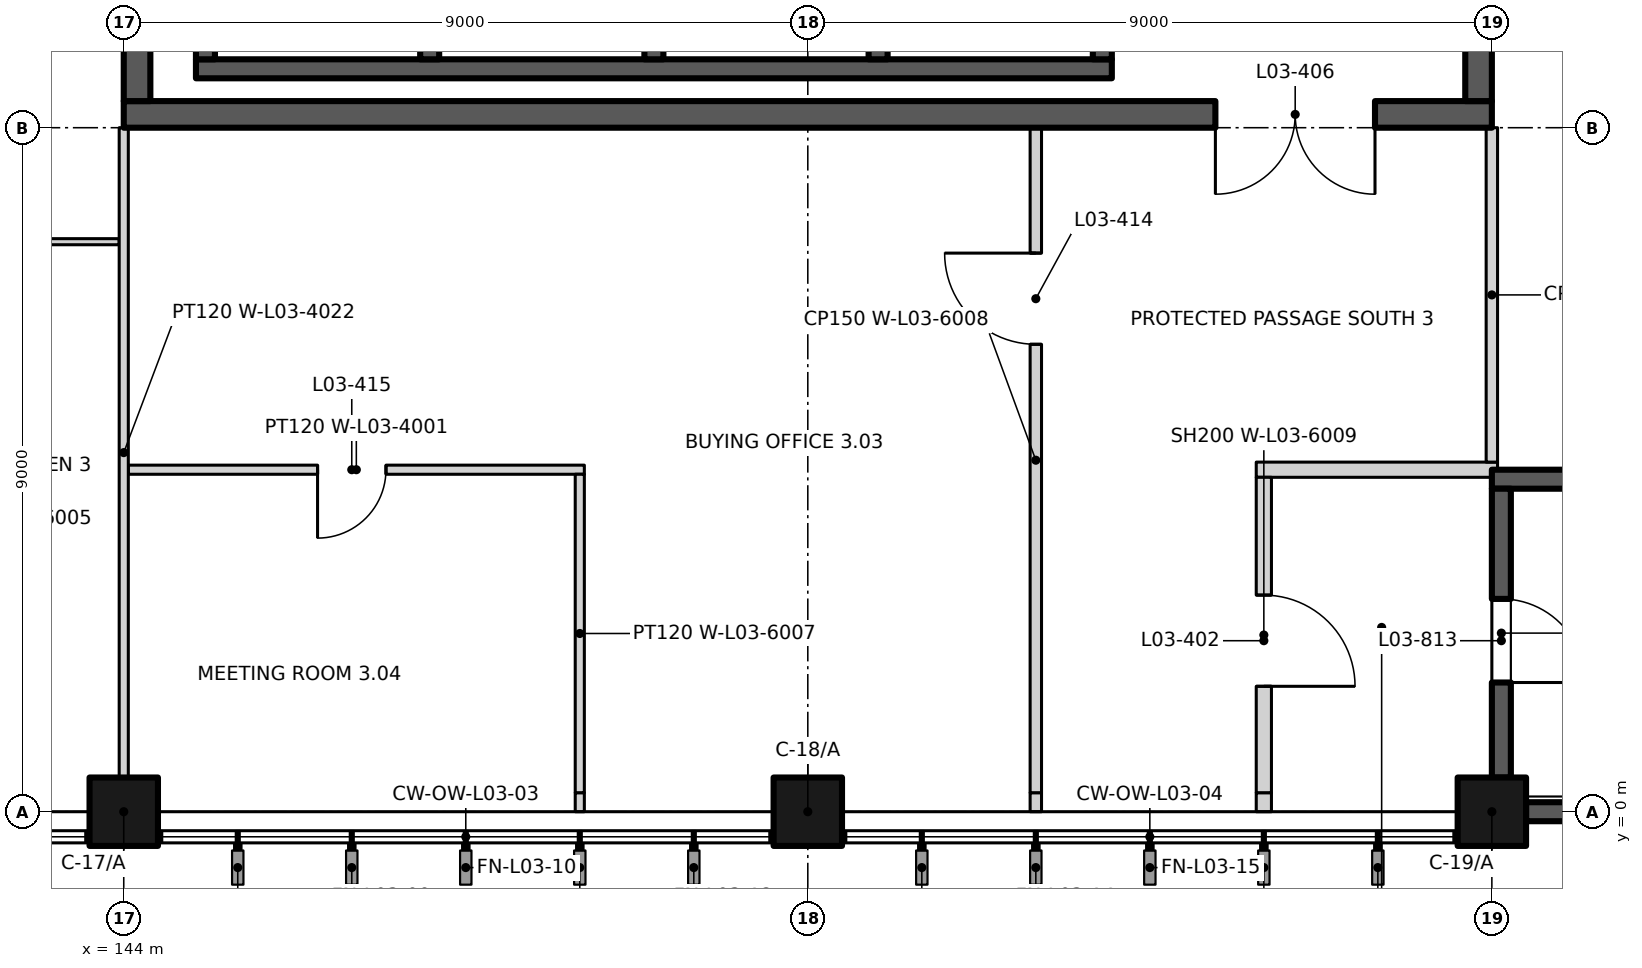
"""IFC4 building model, lengths in metres.
Left out: names, types, materials, properties, quantities, classifications, styles, units other than length and angle.
Written with IfcOpenShell. Run it as: python <this file> out.ifc"""

import sys

from ifc_helpers import new_model, si_unit, direction, frame, frame_2d, origin, origin_2d, place, context, subcontext, project, spatial, rectangle, extrude, element, fill, save


model = new_model("IFC4")
c1 = context("Model", 3, precision=1e-05, world=origin(), true_north=direction((0.0, 1.0)))
c2 = subcontext(c1, "Body", "Model", "MODEL_VIEW")
j1 = project(units=[si_unit("LENGTHUNIT", "METRE"), si_unit("PLANEANGLEUNIT", "RADIAN")], contexts=[c1])
p1 = place(None, origin())
s1 = spatial("IfcSite", under=j1, at=p1, CompositionType="ELEMENT")
p2 = place(p1, origin())
s2 = spatial("IfcBuilding", under=s1, at=p2, CompositionType="ELEMENT")
p3 = place(p2, frame((0.0, 0.0, 15.0)))
s3 = spatial("IfcBuildingStorey", under=s2, at=p3, CompositionType="ELEMENT", Elevation=15.0)
for number, where, z_axis, x_axis in (
    (1, (144.0, 0.0, 0.0), (0.0, 0.0, 1.0), (1.0, 0.0, 0.0)),
    (2, (153.0, 0.0, 0.0), (0.0, 0.0, 1.0), (1.0, 0.0, 0.0)),
    (3, (162.0, 0.0, 0.0), (0.0, 0.0, 1.0), (1.0, 0.0, 0.0)),
):
    element("IfcColumn", number, at=place(p3, frame(where, z_axis=z_axis, x_axis=x_axis)), inside=s3, PredefinedType="COLUMN", context=c2, shape_type="SweptSolid", body=[
        extrude(rectangle(XDim=0.9, YDim=0.9, at=origin_2d()), origin(), (0.0, 0.0, 1.0), 4.5),
    ])
p4 = place(p3, frame((162.45, 0.0, 0.0), z_axis=(0.0, 0.0, 1.0), x_axis=(1.0, 0.0, 0.0)))
e4 = element("IfcWall", 4, at=p4, inside=s3, PredefinedType="SHEAR", context=c2, shape_type="SweptSolid", body=[
    extrude(rectangle(XDim=8.1, YDim=0.25, at=frame_2d((4.05, 0.0))), origin(), (0.0, 0.0, 1.0), 4.5),
])
p5 = place(p3, frame((162.0, 4.375, 0.0), z_axis=(0.0, 0.0, 1.0), x_axis=(1.0, 0.0, 0.0)))
e5 = element("IfcWall", 5, at=p5, inside=s3, PredefinedType="SHEAR", context=c2, shape_type="SweptSolid", body=[
    extrude(rectangle(XDim=9.0, YDim=0.25, at=frame_2d((4.5, 0.0))), origin(), (0.0, 0.0, 1.0), 4.5),
])
p6 = place(p3, frame((162.125, 0.45, 0.0), z_axis=(0.0, 0.0, 1.0), x_axis=(0.0, 1.0, 0.0)))
e6 = element("IfcWall", 6, at=p6, inside=s3, PredefinedType="SHEAR", context=c2, shape_type="SweptSolid", body=[
    extrude(rectangle(XDim=3.8, YDim=0.25, at=frame_2d((1.9, 0.0))), origin(), (0.0, 0.0, 1.0), 4.5),
])
p7 = place(p6, frame((2.35, 0.0, 0.0), z_axis=(0.0, 0.0, 1.0), x_axis=(-1.0, 0.0, 0.0)))
e7 = element("IfcOpeningElement", 7, at=p7, cuts=e6, PredefinedType="OPENING", context=c2, shape_type="SweptSolid", body=[
    extrude(rectangle(XDim=1.1, YDim=2.1, at=frame_2d((0.55, 1.05))), frame((0.0, 0.135, 0.0), z_axis=(0.0, -1.0, 0.0), x_axis=(1.0, 0.0, 0.0)), (0.0, 0.0, 1.0), 0.27),
])
p8 = place(p3, frame((144.95, 9.775, 0.0), z_axis=(0.0, 0.0, 1.0), x_axis=(1.0, 0.0, 0.0)))
e8 = element("IfcWall", 8, at=p8, inside=s3, PredefinedType="SHEAR", context=c2, shape_type="SweptSolid", body=[
    extrude(rectangle(XDim=12.05, YDim=0.25, at=frame_2d((6.025, 0.0))), origin(), (0.0, 0.0, 1.0), 4.5),
])
for number, where, z_axis, x_axis in (
    (9, (145.075, 9.9, 0.0), (0.0, 0.0, 1.0), (0.0, 1.0, 0.0)),
    (10, (148.025, 9.9, 0.0), (0.0, 0.0, 1.0), (0.0, 1.0, 0.0)),
    (11, (150.975, 9.9, 0.0), (0.0, 0.0, 1.0), (0.0, 1.0, 0.0)),
    (12, (153.925, 9.9, 0.0), (0.0, 0.0, 1.0), (0.0, 1.0, 0.0)),
    (13, (156.875, 9.9, 0.0), (0.0, 0.0, 1.0), (0.0, 1.0, 0.0)),
):
    element("IfcWall", number, at=place(p3, frame(where, z_axis=z_axis, x_axis=x_axis)), inside=s3, PredefinedType="SHEAR", context=c2, shape_type="SweptSolid", body=[
        extrude(rectangle(XDim=2.7, YDim=0.25, at=frame_2d((1.35, 0.0))), origin(), (0.0, 0.0, 1.0), 4.5),
    ])
p9 = place(p3, frame((144.06, 4.5, 0.0), z_axis=(0.0, 0.0, 1.0), x_axis=(1.0, 0.0, 0.0)))
e14 = element("IfcWall", 14, at=p9, inside=s3, PredefinedType="PARTITIONING", context=c2, shape_type="SweptSolid", body=[
    extrude(rectangle(XDim=6.0, YDim=0.12, at=frame_2d((3.0, 0.0))), origin(), (0.0, 0.0, 1.0), 4.2),
])
p10 = place(p9, frame((3.39, 0.0, 0.0), z_axis=(0.0, 0.0, 1.0), x_axis=(-1.0, 0.0, 0.0)))
e15 = element("IfcOpeningElement", 15, at=p10, cuts=e14, PredefinedType="OPENING", context=c2, shape_type="SweptSolid", body=[
    extrude(rectangle(XDim=0.9, YDim=2.1, at=frame_2d((0.45, 1.05))), frame((0.0, 0.07, 0.0), z_axis=(0.0, -1.0, 0.0), x_axis=(1.0, 0.0, 0.0)), (0.0, 0.0, 1.0), 0.14),
])
p11 = place(p3, frame((158.9, 4.5, 0.0), z_axis=(0.0, 0.0, 1.0), x_axis=(1.0, 0.0, 0.0)))
e16 = element("IfcWall", 16, at=p11, inside=s3, PredefinedType="PARTITIONING", context=c2, shape_type="SweptSolid", body=[
    extrude(rectangle(XDim=3.175, YDim=0.2, at=frame_2d((1.587, 0.0))), origin(), (0.0, 0.0, 1.0), 4.2),
])
p12 = place(p3, frame((135.06, 7.5, 0.0), z_axis=(0.0, 0.0, 1.0), x_axis=(1.0, 0.0, 0.0)))
e17 = element("IfcWall", 17, at=p12, inside=s3, PredefinedType="PARTITIONING", context=c2, shape_type="SweptSolid", body=[
    extrude(rectangle(XDim=8.88, YDim=0.08, at=frame_2d((4.44, 0.0))), origin(), (0.0, 0.0, 1.0), 4.2),
])
p13 = place(p12, frame((4.64, 0.0, 0.0), z_axis=(0.0, 0.0, 1.0), x_axis=(-1.0, 0.0, 0.0)))
e18 = element("IfcOpeningElement", 18, at=p13, cuts=e17, PredefinedType="OPENING", context=c2, shape_type="SweptSolid", body=[
    extrude(rectangle(XDim=0.9, YDim=2.1, at=frame_2d((0.45, 1.05))), frame((0.0, 0.05, 0.0), z_axis=(0.0, -1.0, 0.0), x_axis=(1.0, 0.0, 0.0)), (0.0, 0.0, 1.0), 0.1),
])
p14 = place(p12, frame((7.89, 0.0, 0.0), z_axis=(0.0, 0.0, 1.0), x_axis=(-1.0, 0.0, 0.0)))
e19 = element("IfcOpeningElement", 19, at=p14, cuts=e17, PredefinedType="OPENING", context=c2, shape_type="SweptSolid", body=[
    extrude(rectangle(XDim=0.9, YDim=2.1, at=frame_2d((0.45, 1.05))), frame((0.0, 0.05, 0.0), z_axis=(0.0, -1.0, 0.0), x_axis=(1.0, 0.0, 0.0)), (0.0, 0.0, 1.0), 0.1),
])
p15 = place(p3, frame((144.0, 9.175, 0.0), z_axis=(0.0, 0.0, 1.0), x_axis=(1.0, 0.0, 0.0)))
e20 = element("IfcWall", 20, at=p15, inside=s3, PredefinedType="SHEAR", context=c2, shape_type="SweptSolid", body=[
    extrude(rectangle(XDim=18.0, YDim=0.35, at=frame_2d((9.0, 0.0))), origin(), (0.0, 0.0, 1.0), 4.2),
])
p16 = place(p15, frame((16.463, 0.0, 0.0), z_axis=(0.0, 0.0, 1.0), x_axis=(-1.0, 0.0, 0.0)))
e21 = element("IfcOpeningElement", 21, at=p16, cuts=e20, PredefinedType="OPENING", context=c2, shape_type="SweptSolid", body=[
    extrude(rectangle(XDim=2.1, YDim=2.4, at=frame_2d((1.05, 1.2))), frame((0.0, 0.185, 0.0), z_axis=(0.0, -1.0, 0.0), x_axis=(1.0, 0.0, 0.0)), (0.0, 0.0, 1.0), 0.37),
])
p17 = place(p3, frame((144.0, 0.45, 0.0), z_axis=(0.0, 0.0, 1.0), x_axis=(0.0, 1.0, 0.0)))
e22 = element("IfcWall", 22, at=p17, inside=s3, PredefinedType="PARTITIONING", context=c2, shape_type="SweptSolid", body=[
    extrude(rectangle(XDim=8.55, YDim=0.12, at=frame_2d((4.275, 0.0))), origin(), (0.0, 0.0, 1.0), 4.2),
])
p18 = place(p3, frame((144.175, 9.35, 0.0), z_axis=(0.0, 0.0, 1.0), x_axis=(0.0, 1.0, 0.0)))
e23 = element("IfcWall", 23, at=p18, inside=s3, PredefinedType="SHEAR", context=c2, shape_type="SweptSolid", body=[
    extrude(rectangle(XDim=17.4, YDim=0.35, at=frame_2d((8.7, 0.0))), origin(), (0.0, 0.0, 1.0), 4.2),
])
p19 = place(p18, frame((3.75, 0.0, 0.0)))
e24 = element("IfcOpeningElement", 24, at=p19, cuts=e23, PredefinedType="OPENING", context=c2, shape_type="SweptSolid", body=[
    extrude(rectangle(XDim=1.6, YDim=2.4, at=frame_2d((0.8, 1.2))), frame((0.0, 0.185, 0.0), z_axis=(0.0, -1.0, 0.0), x_axis=(1.0, 0.0, 0.0)), (0.0, 0.0, 1.0), 0.37),
])
p20 = place(p3, frame((150.0, 0.0, 0.0), z_axis=(0.0, 0.0, 1.0), x_axis=(0.0, 1.0, 0.0)))
e25 = element("IfcWall", 25, at=p20, inside=s3, PredefinedType="PARTITIONING", context=c2, shape_type="SweptSolid", body=[
    extrude(rectangle(XDim=0.25, YDim=0.12, at=frame_2d((0.125, 0.0))), origin(), (0.0, 0.0, 1.0), 3.6),
])
p21 = place(p3, frame((150.0, 0.25, 0.0), z_axis=(0.0, 0.0, 1.0), x_axis=(0.0, 1.0, 0.0)))
e26 = element("IfcWall", 26, at=p21, inside=s3, PredefinedType="PARTITIONING", context=c2, shape_type="SweptSolid", body=[
    extrude(rectangle(XDim=4.19, YDim=0.12, at=frame_2d((2.095, 0.0))), origin(), (0.0, 0.0, 1.0), 4.2),
])
p22 = place(p3, frame((156.0, 0.0, 0.0), z_axis=(0.0, 0.0, 1.0), x_axis=(0.0, 1.0, 0.0)))
e27 = element("IfcWall", 27, at=p22, inside=s3, PredefinedType="PARTITIONING", context=c2, shape_type="SweptSolid", body=[
    extrude(rectangle(XDim=0.25, YDim=0.15, at=frame_2d((0.125, 0.0))), origin(), (0.0, 0.0, 1.0), 3.6),
])
p23 = place(p3, frame((156.0, 0.25, 0.0), z_axis=(0.0, 0.0, 1.0), x_axis=(0.0, 1.0, 0.0)))
e28 = element("IfcWall", 28, at=p23, inside=s3, PredefinedType="PARTITIONING", context=c2, shape_type="SweptSolid", body=[
    extrude(rectangle(XDim=8.75, YDim=0.15, at=frame_2d((4.375, 0.0))), origin(), (0.0, 0.0, 1.0), 4.2),
])
p24 = place(p23, frame((5.9, 0.0, 0.0)))
e29 = element("IfcOpeningElement", 29, at=p24, cuts=e28, PredefinedType="OPENING", context=c2, shape_type="SweptSolid", body=[
    extrude(rectangle(XDim=1.2, YDim=2.1, at=frame_2d((0.6, 1.05))), frame((0.0, 0.085, 0.0), z_axis=(0.0, -1.0, 0.0), x_axis=(1.0, 0.0, 0.0)), (0.0, 0.0, 1.0), 0.17),
])
p25 = place(p3, frame((159.0, 0.0, 0.0), z_axis=(0.0, 0.0, 1.0), x_axis=(0.0, 1.0, 0.0)))
e30 = element("IfcWall", 30, at=p25, inside=s3, PredefinedType="PARTITIONING", context=c2, shape_type="SweptSolid", body=[
    extrude(rectangle(XDim=0.25, YDim=0.2, at=frame_2d((0.125, 0.0))), origin(), (0.0, 0.0, 1.0), 3.6),
])
p26 = place(p3, frame((159.0, 0.25, 0.0), z_axis=(0.0, 0.0, 1.0), x_axis=(0.0, 1.0, 0.0)))
e31 = element("IfcWall", 31, at=p26, inside=s3, PredefinedType="PARTITIONING", context=c2, shape_type="SweptSolid", body=[
    extrude(rectangle(XDim=4.15, YDim=0.2, at=frame_2d((2.075, 0.0))), origin(), (0.0, 0.0, 1.0), 4.2),
])
p27 = place(p26, frame((2.6, 0.0, 0.0), z_axis=(0.0, 0.0, 1.0), x_axis=(-1.0, 0.0, 0.0)))
e32 = element("IfcOpeningElement", 32, at=p27, cuts=e31, PredefinedType="OPENING", context=c2, shape_type="SweptSolid", body=[
    extrude(rectangle(XDim=1.2, YDim=2.1, at=frame_2d((0.6, 1.05))), frame((0.0, 0.11, 0.0), z_axis=(0.0, -1.0, 0.0), x_axis=(1.0, 0.0, 0.0)), (0.0, 0.0, 1.0), 0.22),
])
p28 = place(p3, frame((161.825, 9.35, 0.0), z_axis=(0.0, 0.0, 1.0), x_axis=(0.0, 1.0, 0.0)))
e33 = element("IfcWall", 33, at=p28, inside=s3, PredefinedType="SHEAR", context=c2, shape_type="SweptSolid", body=[
    extrude(rectangle(XDim=17.4, YDim=0.35, at=frame_2d((8.7, 0.0))), origin(), (0.0, 0.0, 1.0), 4.2),
])
p29 = place(p28, frame((7.3, 0.0, 0.0), z_axis=(0.0, 0.0, 1.0), x_axis=(-1.0, 0.0, 0.0)))
e34 = element("IfcOpeningElement", 34, at=p29, cuts=e33, PredefinedType="OPENING", context=c2, shape_type="SweptSolid", body=[
    extrude(rectangle(XDim=1.8, YDim=2.4, at=frame_2d((0.9, 1.2))), frame((0.0, 0.185, 0.0), z_axis=(0.0, -1.0, 0.0), x_axis=(1.0, 0.0, 0.0)), (0.0, 0.0, 1.0), 0.37),
])
p30 = place(p3, frame((162.0, 4.6, 0.0), z_axis=(0.0, 0.0, 1.0), x_axis=(0.0, 1.0, 0.0)))
e35 = element("IfcWall", 35, at=p30, inside=s3, PredefinedType="PARTITIONING", context=c2, shape_type="SweptSolid", body=[
    extrude(rectangle(XDim=4.4, YDim=0.15, at=frame_2d((2.2, 0.0))), origin(), (0.0, 0.0, 1.0), 4.2),
])
p31 = place(p7, origin())
e36 = element("IfcDoor", 36, at=p31, inside=s3, OperationType="SINGLE_SWING_RIGHT", PredefinedType="DOOR", context=c2, shape_type="SweptSolid", body=[
    extrude(rectangle(XDim=1.1, YDim=2.1, at=frame_2d((0.55, 1.05))), frame((0.0, 0.025, 0.0), z_axis=(0.0, -1.0, 0.0), x_axis=(1.0, 0.0, 0.0)), (0.0, 0.0, 1.0), 0.05),
])
fill(e7, e36)
p32 = place(p27, origin())
e37 = element("IfcDoor", 37, at=p32, inside=s3, OperationType="SINGLE_SWING_RIGHT", PredefinedType="DOOR", context=c2, shape_type="SweptSolid", body=[
    extrude(rectangle(XDim=1.2, YDim=2.1, at=frame_2d((0.6, 1.05))), frame((0.0, 0.025, 0.0), z_axis=(0.0, -1.0, 0.0), x_axis=(1.0, 0.0, 0.0)), (0.0, 0.0, 1.0), 0.05),
])
fill(e32, e37)
p33 = place(p16, origin())
e38 = element("IfcDoor", 38, at=p33, inside=s3, OperationType="DOUBLE_DOOR_SINGLE_SWING", PredefinedType="DOOR", context=c2, shape_type="SweptSolid", body=[
    extrude(rectangle(XDim=2.1, YDim=2.4, at=frame_2d((1.05, 1.2))), frame((0.0, 0.025, 0.0), z_axis=(0.0, -1.0, 0.0), x_axis=(1.0, 0.0, 0.0)), (0.0, 0.0, 1.0), 0.05),
])
fill(e21, e38)
p34 = place(p24, origin())
e39 = element("IfcDoor", 39, at=p34, inside=s3, OperationType="SINGLE_SWING_RIGHT", PredefinedType="DOOR", context=c2, shape_type="SweptSolid", body=[
    extrude(rectangle(XDim=1.2, YDim=2.1, at=frame_2d((0.6, 1.05))), frame((0.0, 0.025, 0.0), z_axis=(0.0, -1.0, 0.0), x_axis=(1.0, 0.0, 0.0)), (0.0, 0.0, 1.0), 0.05),
])
fill(e29, e39)
p35 = place(p10, origin())
e40 = element("IfcDoor", 40, at=p35, inside=s3, OperationType="SINGLE_SWING_RIGHT", PredefinedType="DOOR", context=c2, shape_type="SweptSolid", body=[
    extrude(rectangle(XDim=0.9, YDim=2.1, at=frame_2d((0.45, 1.05))), frame((0.0, 0.025, 0.0), z_axis=(0.0, -1.0, 0.0), x_axis=(1.0, 0.0, 0.0)), (0.0, 0.0, 1.0), 0.05),
])
fill(e15, e40)
save(model, sys.argv[1])
